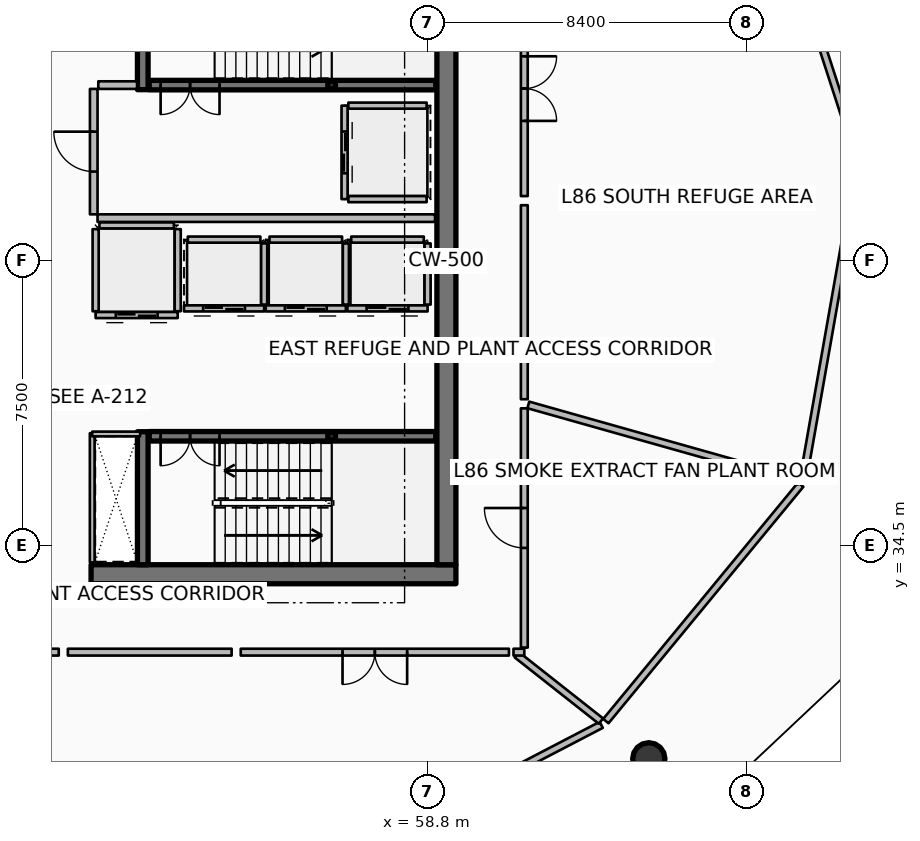
"""IFC4 building model, lengths in metres.
Left out: names, types, materials, properties, quantities, classifications, styles, units other than length and angle.
Written with IfcOpenShell. Run it as: python <this file> out.ifc"""

import sys

from ifc_helpers import new_model, si_unit, direction, frame, frame_2d, origin, origin_2d, place, context, subcontext, project, spatial, rectangle, hollow_rectangle, circle, extrude, element, fill, save


model = new_model("IFC4")
c1 = context("Model", 3, precision=1e-05, world=origin(), true_north=direction((0.0, 1.0)))
c2 = subcontext(c1, "Body", "Model", "MODEL_VIEW")
j1 = project(units=[si_unit("LENGTHUNIT", "METRE"), si_unit("PLANEANGLEUNIT", "RADIAN")], contexts=[c1])
p1 = place(None, origin())
s1 = spatial("IfcSite", under=j1, at=p1, CompositionType="ELEMENT")
p2 = place(p1, origin())
s2 = spatial("IfcBuilding", under=s1, at=p2, CompositionType="ELEMENT")
p3 = place(p2, frame((0.0, 0.0, 343.1)))
s3 = spatial("IfcBuildingStorey", under=s2, at=p3, CompositionType="ELEMENT", Elevation=343.1)
p4 = place(p3, frame((49.95, 33.75, 0.0), z_axis=(0.0, 0.0, 1.0), x_axis=(1.0, 0.0, 0.0)))
e1 = element("IfcWall", 1, at=p4, inside=s3, PredefinedType="SHEAR", context=c2, shape_type="SweptSolid", body=[
    extrude(rectangle(XDim=9.6, YDim=0.5, at=frame_2d((4.8, 0.0))), origin(), (0.0, 0.0, 1.0), 4.2),
])
p5 = place(p3, frame((59.3, 34.0, 0.0), z_axis=(0.0, 0.0, 1.0), x_axis=(0.0, 1.0, 0.0)))
e2 = element("IfcWall", 2, at=p5, inside=s3, PredefinedType="SHEAR", context=c2, shape_type="SweptSolid", body=[
    extrude(rectangle(XDim=16.0, YDim=0.5, at=frame_2d((8.0, 0.0))), origin(), (0.0, 0.0, 1.0), 4.2),
])
for number, where, z_axis, x_axis in (
    (3, (51.31, 46.5, 0.0), (0.0, 0.0, 1.0), (0.0, 1.0, 0.0)),
    (4, (51.31, 34.0, 0.0), (0.0, 0.0, 1.0), (0.0, 1.0, 0.0)),
):
    element("IfcWall", number, at=place(p3, frame(where, z_axis=z_axis, x_axis=x_axis)), inside=s3, PredefinedType="SHEAR", context=c2, shape_type="SweptSolid", body=[
        extrude(rectangle(XDim=3.5, YDim=0.28, at=frame_2d((1.75, 0.0))), origin(), (0.0, 0.0, 1.0), 4.2),
    ])
for number, where, z_axis, x_axis in (
    (5, (56.28, 46.62, 0.0), (0.0, 0.0, 1.0), (1.0, 0.0, 0.0)),
    (6, (56.28, 37.38, 0.0), (0.0, 0.0, 1.0), (1.0, 0.0, 0.0)),
):
    element("IfcColumn", number, at=place(p3, frame(where, z_axis=z_axis, x_axis=x_axis)), inside=s3, PredefinedType="COLUMN", context=c2, shape_type="SweptSolid", body=[
        extrude(hollow_rectangle(XDim=0.2, YDim=0.2, WallThickness=0.01, InnerFilletRadius=0.01, OuterFilletRadius=0.02, at=origin_2d()), origin(), (0.0, 0.0, 1.0), 1.895),
    ])
p6 = place(p3, frame((64.626, 28.893, 0.0), z_axis=(0.0, 0.0, 1.0), x_axis=(1.0, 0.0, 0.0)))
e7 = element("IfcColumn", 7, at=p6, inside=s3, PredefinedType="COLUMN", context=c2, shape_type="SweptSolid", body=[
    extrude(circle(Radius=0.425, at=origin_2d()), origin(), (0.0, 0.0, 1.0), 3.94),
])
p7 = place(p3, frame((51.48, 46.62, 0.0), z_axis=(0.0, 0.0, 1.0), x_axis=(1.0, 0.0, 0.0)))
e8 = element("IfcWall", 8, at=p7, inside=s3, PredefinedType="SOLIDWALL", context=c2, shape_type="SweptSolid", body=[
    extrude(rectangle(XDim=7.54, YDim=0.25, at=frame_2d((3.77, 0.0))), origin(), (0.0, 0.0, 1.0), 3.94),
])
p8 = place(p7, frame((0.3, 0.0, 0.0)))
e9 = element("IfcOpeningElement", 9, at=p8, cuts=e8, PredefinedType="OPENING", context=c2, shape_type="SweptSolid", body=[
    extrude(rectangle(XDim=1.55, YDim=2.15, at=frame_2d((0.775, 1.075))), frame((0.0, 0.135, 0.0), z_axis=(0.0, -1.0, 0.0), x_axis=(1.0, 0.0, 0.0)), (0.0, 0.0, 1.0), 0.27),
])
p9 = place(p3, frame((51.48, 37.38, 0.0), z_axis=(0.0, 0.0, 1.0), x_axis=(1.0, 0.0, 0.0)))
e10 = element("IfcWall", 10, at=p9, inside=s3, PredefinedType="SOLIDWALL", context=c2, shape_type="SweptSolid", body=[
    extrude(rectangle(XDim=7.54, YDim=0.25, at=frame_2d((3.77, 0.0))), origin(), (0.0, 0.0, 1.0), 3.94),
])
p10 = place(p9, frame((0.3, 0.0, 0.0)))
e11 = element("IfcOpeningElement", 11, at=p10, cuts=e10, PredefinedType="OPENING", context=c2, shape_type="SweptSolid", body=[
    extrude(rectangle(XDim=1.55, YDim=2.15, at=frame_2d((0.775, 1.075))), frame((0.0, 0.135, 0.0), z_axis=(0.0, -1.0, 0.0), x_axis=(1.0, 0.0, 0.0)), (0.0, 0.0, 1.0), 0.27),
])
p11 = place(p3, frame((54.505, 40.745, 0.0), z_axis=(0.0, 0.0, 1.0), x_axis=(-1.0, 0.0, 0.0)))
e12 = element("IfcWall", 12, at=p11, inside=s3, PredefinedType="PARTITIONING", context=c2, shape_type="SweptSolid", body=[
    extrude(rectangle(XDim=2.11, YDim=0.16, at=frame_2d((1.055, 0.0))), origin(), (0.0, 0.0, 1.0), 3.94),
])
p12 = place(p11, frame((0.505, 0.0, 0.0)))
e13 = element("IfcOpeningElement", 13, at=p12, cuts=e12, PredefinedType="OPENING", context=c2, shape_type="SweptSolid", body=[
    extrude(rectangle(XDim=1.1, YDim=2.1, at=frame_2d((0.55, 1.05))), frame((0.0, 0.09, 0.0), z_axis=(0.0, -1.0, 0.0), x_axis=(1.0, 0.0, 0.0)), (0.0, 0.0, 1.0), 0.18),
])
p13 = place(p3, frame((54.505, 40.845, 0.0), z_axis=(0.0, 0.0, 1.0), x_axis=(0.0, 1.0, 0.0)))
e14 = element("IfcWall", 14, at=p13, inside=s3, PredefinedType="PARTITIONING", context=c2, shape_type="SweptSolid", body=[
    extrude(rectangle(XDim=1.61, YDim=0.16, at=frame_2d((0.805, 0.0))), origin(), (0.0, 0.0, 1.0), 3.94),
])
p14 = place(p3, frame((52.495, 42.555, 0.0), z_axis=(0.0, 0.0, 1.0), x_axis=(1.0, 0.0, 0.0)))
e15 = element("IfcWall", 15, at=p14, inside=s3, PredefinedType="PARTITIONING", context=c2, shape_type="SweptSolid", body=[
    extrude(rectangle(XDim=1.91, YDim=0.16, at=frame_2d((0.955, 0.0))), origin(), (0.0, 0.0, 1.0), 3.94),
])
p15 = place(p3, frame((56.655, 40.745, 0.0), z_axis=(0.0, 0.0, 1.0), x_axis=(-1.0, 0.0, 0.0)))
e16 = element("IfcWall", 16, at=p15, inside=s3, PredefinedType="PARTITIONING", context=c2, shape_type="SweptSolid", body=[
    extrude(rectangle(XDim=2.11, YDim=0.16, at=frame_2d((1.055, 0.0))), origin(), (0.0, 0.0, 1.0), 3.94),
])
p16 = place(p15, frame((0.505, 0.0, 0.0)))
e17 = element("IfcOpeningElement", 17, at=p16, cuts=e16, PredefinedType="OPENING", context=c2, shape_type="SweptSolid", body=[
    extrude(rectangle(XDim=1.1, YDim=2.1, at=frame_2d((0.55, 1.05))), frame((0.0, 0.09, 0.0), z_axis=(0.0, -1.0, 0.0), x_axis=(1.0, 0.0, 0.0)), (0.0, 0.0, 1.0), 0.18),
])
p17 = place(p3, frame((56.655, 40.845, 0.0), z_axis=(0.0, 0.0, 1.0), x_axis=(0.0, 1.0, 0.0)))
e18 = element("IfcWall", 18, at=p17, inside=s3, PredefinedType="PARTITIONING", context=c2, shape_type="SweptSolid", body=[
    extrude(rectangle(XDim=1.61, YDim=0.16, at=frame_2d((0.805, 0.0))), origin(), (0.0, 0.0, 1.0), 3.94),
])
p18 = place(p3, frame((54.645, 42.555, 0.0), z_axis=(0.0, 0.0, 1.0), x_axis=(1.0, 0.0, 0.0)))
e19 = element("IfcWall", 19, at=p18, inside=s3, PredefinedType="PARTITIONING", context=c2, shape_type="SweptSolid", body=[
    extrude(rectangle(XDim=1.91, YDim=0.16, at=frame_2d((0.955, 0.0))), origin(), (0.0, 0.0, 1.0), 3.94),
])
p19 = place(p3, frame((58.805, 40.745, 0.0), z_axis=(0.0, 0.0, 1.0), x_axis=(-1.0, 0.0, 0.0)))
e20 = element("IfcWall", 20, at=p19, inside=s3, PredefinedType="PARTITIONING", context=c2, shape_type="SweptSolid", body=[
    extrude(rectangle(XDim=2.11, YDim=0.16, at=frame_2d((1.055, 0.0))), origin(), (0.0, 0.0, 1.0), 3.94),
])
p20 = place(p19, frame((0.505, 0.0, 0.0)))
e21 = element("IfcOpeningElement", 21, at=p20, cuts=e20, PredefinedType="OPENING", context=c2, shape_type="SweptSolid", body=[
    extrude(rectangle(XDim=1.1, YDim=2.1, at=frame_2d((0.55, 1.05))), frame((0.0, 0.09, 0.0), z_axis=(0.0, -1.0, 0.0), x_axis=(1.0, 0.0, 0.0)), (0.0, 0.0, 1.0), 0.18),
])
p21 = place(p3, frame((58.805, 40.845, 0.0), z_axis=(0.0, 0.0, 1.0), x_axis=(0.0, 1.0, 0.0)))
e22 = element("IfcWall", 22, at=p21, inside=s3, PredefinedType="PARTITIONING", context=c2, shape_type="SweptSolid", body=[
    extrude(rectangle(XDim=1.61, YDim=0.16, at=frame_2d((0.805, 0.0))), origin(), (0.0, 0.0, 1.0), 3.94),
])
p22 = place(p3, frame((56.795, 42.555, 0.0), z_axis=(0.0, 0.0, 1.0), x_axis=(1.0, 0.0, 0.0)))
e23 = element("IfcWall", 23, at=p22, inside=s3, PredefinedType="PARTITIONING", context=c2, shape_type="SweptSolid", body=[
    extrude(rectangle(XDim=1.91, YDim=0.16, at=frame_2d((0.955, 0.0))), origin(), (0.0, 0.0, 1.0), 3.94),
])
p23 = place(p3, frame((56.62, 46.08, 0.0), z_axis=(0.0, 0.0, 1.0), x_axis=(0.0, -1.0, 0.0)))
e24 = element("IfcWall", 24, at=p23, inside=s3, PredefinedType="PARTITIONING", context=c2, shape_type="SweptSolid", body=[
    extrude(rectangle(XDim=2.46, YDim=0.16, at=frame_2d((1.23, 0.0))), origin(), (0.0, 0.0, 1.0), 3.94),
])
p24 = place(p23, frame((0.68, 0.0, 0.0)))
e25 = element("IfcOpeningElement", 25, at=p24, cuts=e24, PredefinedType="OPENING", context=c2, shape_type="SweptSolid", body=[
    extrude(rectangle(XDim=1.1, YDim=2.1, at=frame_2d((0.55, 1.05))), frame((0.0, 0.09, 0.0), z_axis=(0.0, -1.0, 0.0), x_axis=(1.0, 0.0, 0.0)), (0.0, 0.0, 1.0), 0.18),
])
for number, where, z_axis, x_axis in (
    (26, (56.72, 46.08, 0.0), (0.0, 0.0, 1.0), (1.0, 0.0, 0.0)),
    (27, (56.72, 43.62, 0.0), (0.0, 0.0, 1.0), (1.0, 0.0, 0.0)),
):
    element("IfcWall", number, at=place(p3, frame(where, z_axis=z_axis, x_axis=x_axis)), inside=s3, PredefinedType="PARTITIONING", context=c2, shape_type="SweptSolid", body=[
        extrude(rectangle(XDim=2.06, YDim=0.16, at=frame_2d((1.03, 0.0))), origin(), (0.0, 0.0, 1.0), 3.94),
    ])
p25 = place(p3, frame((52.23, 40.57, 0.0), z_axis=(0.0, 0.0, 1.0), x_axis=(-1.0, 0.0, 0.0)))
e28 = element("IfcWall", 28, at=p25, inside=s3, PredefinedType="PARTITIONING", context=c2, shape_type="SweptSolid", body=[
    extrude(rectangle(XDim=2.16, YDim=0.16, at=frame_2d((1.08, 0.0))), origin(), (0.0, 0.0, 1.0), 3.94),
])
p26 = place(p25, frame((0.53, 0.0, 0.0)))
e29 = element("IfcOpeningElement", 29, at=p26, cuts=e28, PredefinedType="OPENING", context=c2, shape_type="SweptSolid", body=[
    extrude(rectangle(XDim=1.1, YDim=2.1, at=frame_2d((0.55, 1.05))), frame((0.0, 0.09, 0.0), z_axis=(0.0, -1.0, 0.0), x_axis=(1.0, 0.0, 0.0)), (0.0, 0.0, 1.0), 0.18),
])
for number, where, z_axis, x_axis in (
    (30, (52.23, 40.67, 0.0), (0.0, 0.0, 1.0), (0.0, 1.0, 0.0)),
    (31, (50.07, 40.67, 0.0), (0.0, 0.0, 1.0), (0.0, 1.0, 0.0)),
):
    element("IfcWall", number, at=place(p3, frame(where, z_axis=z_axis, x_axis=x_axis)), inside=s3, PredefinedType="PARTITIONING", context=c2, shape_type="SweptSolid", body=[
        extrude(rectangle(XDim=2.16, YDim=0.16, at=frame_2d((1.08, 0.0))), origin(), (0.0, 0.0, 1.0), 3.94),
    ])
p27 = place(p3, frame((50.17, 42.93, 0.0), z_axis=(0.0, 0.0, 1.0), x_axis=(1.0, 0.0, 0.0)))
e32 = element("IfcWall", 32, at=p27, inside=s3, PredefinedType="PARTITIONING", context=c2, shape_type="SweptSolid", body=[
    extrude(rectangle(XDim=1.96, YDim=0.16, at=frame_2d((0.98, 0.0))), origin(), (0.0, 0.0, 1.0), 3.94),
])
p28 = place(p3, frame((50.12, 43.12, 0.0), z_axis=(0.0, 0.0, 1.0), x_axis=(1.0, 0.0, 0.0)))
e33 = element("IfcWall", 33, at=p28, inside=s3, PredefinedType="PARTITIONING", context=c2, shape_type="SweptSolid", body=[
    extrude(rectangle(XDim=8.88, YDim=0.2, at=frame_2d((4.44, 0.0))), origin(), (0.0, 0.0, 1.0), 3.94),
])
p29 = place(p3, frame((50.14, 46.62, 0.0), z_axis=(0.0, 0.0, 1.0), x_axis=(1.0, 0.0, 0.0)))
e34 = element("IfcWall", 34, at=p29, inside=s3, PredefinedType="PARTITIONING", context=c2, shape_type="SweptSolid", body=[
    extrude(rectangle(XDim=1.02, YDim=0.2, at=frame_2d((0.51, 0.0))), origin(), (0.0, 0.0, 1.0), 3.94),
])
p30 = place(p3, frame((50.02, 43.22, 0.0), z_axis=(0.0, 0.0, 1.0), x_axis=(0.0, 1.0, 0.0)))
e35 = element("IfcWall", 35, at=p30, inside=s3, PredefinedType="PARTITIONING", context=c2, shape_type="SweptSolid", body=[
    extrude(rectangle(XDim=3.3, YDim=0.2, at=frame_2d((1.65, 0.0))), origin(), (0.0, 0.0, 1.0), 3.94),
])
p31 = place(p30, frame((1.125, 0.0, 0.0)))
e36 = element("IfcOpeningElement", 36, at=p31, cuts=e35, PredefinedType="OPENING", context=c2, shape_type="SweptSolid", body=[
    extrude(rectangle(XDim=1.05, YDim=2.1, at=frame_2d((0.525, 1.05))), frame((0.0, 0.11, 0.0), z_axis=(0.0, -1.0, 0.0), x_axis=(1.0, 0.0, 0.0)), (0.0, 0.0, 1.0), 0.22),
])
p32 = place(p3, frame((49.98, 34.06, 0.0), z_axis=(0.0, 0.0, 1.0), x_axis=(0.0, 1.0, 0.0)))
e37 = element("IfcWall", 37, at=p32, inside=s3, PredefinedType="PARTITIONING", context=c2, shape_type="SweptSolid", body=[
    extrude(rectangle(XDim=3.4, YDim=0.125, at=frame_2d((1.7, 0.0))), origin(), (0.0, 0.0, 1.0), 3.38),
])
p33 = place(p3, frame((49.98, 37.44, 0.0), z_axis=(0.0, 0.0, 1.0), x_axis=(1.0, 0.0, 0.0)))
e38 = element("IfcWall", 38, at=p33, inside=s3, PredefinedType="PARTITIONING", context=c2, shape_type="SweptSolid", body=[
    extrude(rectangle(XDim=1.26, YDim=0.125, at=frame_2d((0.63, 0.0))), origin(), (0.0, 0.0, 1.0), 3.38),
])
p34 = place(p3, frame((56.837, 26.383, 0.0), z_axis=(0.0, 0.0, 1.0), x_axis=(0.886951970108, 0.461861670548, 0.0)))
e39 = element("IfcWall", 39, at=p34, inside=s3, PredefinedType="PARTITIONING", context=c2, shape_type="SweptSolid", body=[
    extrude(rectangle(XDim=7.37, YDim=0.18, at=frame_2d((3.685, 0.0))), origin(), (0.0, 0.0, 1.0), 2.933),
])
p35 = place(p3, frame((63.496, 29.886, 0.0), z_axis=(0.0, 0.0, 1.0), x_axis=(0.635999094609, 0.771689802743, 0.0)))
e40 = element("IfcWall", 40, at=p35, inside=s3, PredefinedType="PARTITIONING", context=c2, shape_type="SweptSolid", body=[
    extrude(rectangle(XDim=8.062, YDim=0.18, at=frame_2d((4.031, 0.0))), origin(), (0.0, 0.0, 1.0), 2.933),
])
p36 = place(p3, frame((68.688, 36.248, 0.0), z_axis=(0.0, 0.0, 1.0), x_axis=(0.173644811024, 0.984808346636, 0.0)))
e41 = element("IfcWall", 41, at=p36, inside=s3, PredefinedType="PARTITIONING", context=c2, shape_type="SweptSolid", body=[
    extrude(rectangle(XDim=8.425, YDim=0.18, at=frame_2d((4.212, 0.0))), origin(), (0.0, 0.0, 1.0), 2.933),
])
p37 = place(p3, frame((70.141, 44.699, 0.0), z_axis=(0.0, 0.0, 1.0), x_axis=(-0.309030537088, 0.951052115894, 0.0)))
e42 = element("IfcWall", 42, at=p37, inside=s3, PredefinedType="PARTITIONING", context=c2, shape_type="SweptSolid", body=[
    extrude(rectangle(XDim=8.549, YDim=0.18, at=frame_2d((4.274, 0.0))), origin(), (0.0, 0.0, 1.0), 2.933),
])
p38 = place(p3, frame((45.215, 31.7, 0.0), z_axis=(0.0, 0.0, 1.0), x_axis=(1.0, 0.0, 0.0)))
e43 = element("IfcWall", 43, at=p38, inside=s3, PredefinedType="PARTITIONING", context=c2, shape_type="SweptSolid", body=[
    extrude(rectangle(XDim=3.884, YDim=0.18, at=frame_2d((1.942, 0.0))), origin(), (0.0, 0.0, 1.0), 2.933),
])
p39 = place(p3, frame((49.339, 31.7, 0.0), z_axis=(0.0, 0.0, 1.0), x_axis=(1.0, 0.0, 0.0)))
e44 = element("IfcWall", 44, at=p39, inside=s3, PredefinedType="PARTITIONING", context=c2, shape_type="SweptSolid", body=[
    extrude(rectangle(XDim=4.309, YDim=0.18, at=frame_2d((2.155, 0.0))), origin(), (0.0, 0.0, 1.0), 2.933),
])
p40 = place(p3, frame((53.888, 31.7, 0.0), z_axis=(0.0, 0.0, 1.0), x_axis=(1.0, 0.0, 0.0)))
e45 = element("IfcWall", 45, at=p40, inside=s3, PredefinedType="PARTITIONING", context=c2, shape_type="SweptSolid", body=[
    extrude(rectangle(XDim=7.057, YDim=0.18, at=frame_2d((3.529, 0.0))), origin(), (0.0, 0.0, 1.0), 2.933),
])
p41 = place(p40, frame((2.679, 0.0, 0.0)))
e46 = element("IfcOpeningElement", 46, at=p41, cuts=e45, PredefinedType="OPENING", context=c2, shape_type="SweptSolid", body=[
    extrude(rectangle(XDim=1.7, YDim=2.15, at=frame_2d((0.85, 1.075))), frame((0.0, 0.1, 0.0), z_axis=(0.0, -1.0, 0.0), x_axis=(1.0, 0.0, 0.0)), (0.0, 0.0, 1.0), 0.2),
])
p42 = place(p3, frame((61.152, 31.632, 0.0), z_axis=(0.0, 0.0, 1.0), x_axis=(0.785350101028, -0.619051870861, 0.0)))
e47 = element("IfcWall", 47, at=p42, inside=s3, PredefinedType="PARTITIONING", context=c2, shape_type="SweptSolid", body=[
    extrude(rectangle(XDim=2.82, YDim=0.18, at=frame_2d((1.41, 0.0))), origin(), (0.0, 0.0, 1.0), 2.933),
])
p43 = place(p3, frame((61.065, 31.7, 0.0), z_axis=(0.0, 0.0, 1.0), x_axis=(1.0, 0.0, 0.0)))
e48 = element("IfcWall", 48, at=p43, inside=s3, PredefinedType="PARTITIONING", context=c2, shape_type="SweptSolid", body=[
    extrude(rectangle(XDim=0.285, YDim=0.18, at=frame_2d((0.142, 0.0))), origin(), (0.0, 0.0, 1.0), 2.933),
])
p44 = place(p3, frame((61.35, 31.82, 0.0), z_axis=(0.0, 0.0, 1.0), x_axis=(0.0, 1.0, 0.0)))
e49 = element("IfcWall", 49, at=p44, inside=s3, PredefinedType="PARTITIONING", context=c2, shape_type="SweptSolid", body=[
    extrude(rectangle(XDim=6.295, YDim=0.18, at=frame_2d((3.147, 0.0))), origin(), (0.0, 0.0, 1.0), 2.933),
])
p45 = place(p44, frame((2.622, 0.0, 0.0)))
e50 = element("IfcOpeningElement", 50, at=p45, cuts=e49, PredefinedType="OPENING", context=c2, shape_type="SweptSolid", body=[
    extrude(rectangle(XDim=1.05, YDim=2.1, at=frame_2d((0.525, 1.05))), frame((0.0, 0.1, 0.0), z_axis=(0.0, -1.0, 0.0), x_axis=(1.0, 0.0, 0.0)), (0.0, 0.0, 1.0), 0.2),
])
p46 = place(p3, frame((61.456, 38.205, 0.0), z_axis=(0.0, 0.0, 1.0), x_axis=(0.962454537961, -0.271442926522, 0.0)))
e51 = element("IfcWall", 51, at=p46, inside=s3, PredefinedType="PARTITIONING", context=c2, shape_type="SweptSolid", body=[
    extrude(rectangle(XDim=7.4, YDim=0.18, at=frame_2d((3.7, 0.0))), origin(), (0.0, 0.0, 1.0), 2.933),
])
p47 = place(p3, frame((61.35, 38.355, 0.0), z_axis=(0.0, 0.0, 1.0), x_axis=(0.0, 1.0, 0.0)))
e52 = element("IfcWall", 52, at=p47, inside=s3, PredefinedType="PARTITIONING", context=c2, shape_type="SweptSolid", body=[
    extrude(rectangle(XDim=5.105, YDim=0.18, at=frame_2d((2.553, 0.0))), origin(), (0.0, 0.0, 1.0), 2.933),
])
p48 = place(p3, frame((61.35, 43.7, 0.0), z_axis=(0.0, 0.0, 1.0), x_axis=(0.0, 1.0, 0.0)))
e53 = element("IfcWall", 53, at=p48, inside=s3, PredefinedType="PARTITIONING", context=c2, shape_type="SweptSolid", body=[
    extrude(rectangle(XDim=5.656, YDim=0.18, at=frame_2d((2.828, 0.0))), origin(), (0.0, 0.0, 1.0), 2.933),
])
p49 = place(p48, frame((1.978, 0.0, 0.0)))
e54 = element("IfcOpeningElement", 54, at=p49, cuts=e53, PredefinedType="OPENING", context=c2, shape_type="SweptSolid", body=[
    extrude(rectangle(XDim=1.7, YDim=2.15, at=frame_2d((0.85, 1.075))), frame((0.0, 0.1, 0.0), z_axis=(0.0, -1.0, 0.0), x_axis=(1.0, 0.0, 0.0)), (0.0, 0.0, 1.0), 0.2),
])
p50 = place(p8, origin())
e55 = element("IfcDoor", 55, at=p50, inside=s3, OperationType="DOUBLE_DOOR_SINGLE_SWING", PredefinedType="DOOR", context=c2, shape_type="SweptSolid", body=[
    extrude(rectangle(XDim=1.55, YDim=2.15, at=frame_2d((0.775, 1.075))), frame((0.0, 0.025, 0.0), z_axis=(0.0, -1.0, 0.0), x_axis=(1.0, 0.0, 0.0)), (0.0, 0.0, 1.0), 0.05),
])
fill(e9, e55)
p51 = place(p10, origin())
e56 = element("IfcDoor", 56, at=p51, inside=s3, OperationType="DOUBLE_DOOR_SINGLE_SWING", PredefinedType="DOOR", context=c2, shape_type="SweptSolid", body=[
    extrude(rectangle(XDim=1.55, YDim=2.15, at=frame_2d((0.775, 1.075))), frame((0.0, 0.025, 0.0), z_axis=(0.0, -1.0, 0.0), x_axis=(1.0, 0.0, 0.0)), (0.0, 0.0, 1.0), 0.05),
])
fill(e11, e56)
p52 = place(p12, origin())
e57 = element("IfcDoor", 57, at=p52, inside=s3, OperationType="DOUBLE_DOOR_SLIDING", PredefinedType="DOOR", context=c2, shape_type="SweptSolid", body=[
    extrude(rectangle(XDim=1.1, YDim=2.1, at=frame_2d((0.55, 1.05))), frame((0.0, 0.025, 0.0), z_axis=(0.0, -1.0, 0.0), x_axis=(1.0, 0.0, 0.0)), (0.0, 0.0, 1.0), 0.05),
])
fill(e13, e57)
p53 = place(p16, origin())
e58 = element("IfcDoor", 58, at=p53, inside=s3, OperationType="DOUBLE_DOOR_SLIDING", PredefinedType="DOOR", context=c2, shape_type="SweptSolid", body=[
    extrude(rectangle(XDim=1.1, YDim=2.1, at=frame_2d((0.55, 1.05))), frame((0.0, 0.025, 0.0), z_axis=(0.0, -1.0, 0.0), x_axis=(1.0, 0.0, 0.0)), (0.0, 0.0, 1.0), 0.05),
])
fill(e17, e58)
p54 = place(p20, origin())
e59 = element("IfcDoor", 59, at=p54, inside=s3, OperationType="DOUBLE_DOOR_SLIDING", PredefinedType="DOOR", context=c2, shape_type="SweptSolid", body=[
    extrude(rectangle(XDim=1.1, YDim=2.1, at=frame_2d((0.55, 1.05))), frame((0.0, 0.025, 0.0), z_axis=(0.0, -1.0, 0.0), x_axis=(1.0, 0.0, 0.0)), (0.0, 0.0, 1.0), 0.05),
])
fill(e21, e59)
p55 = place(p24, origin())
e60 = element("IfcDoor", 60, at=p55, inside=s3, OperationType="DOUBLE_DOOR_SLIDING", PredefinedType="DOOR", context=c2, shape_type="SweptSolid", body=[
    extrude(rectangle(XDim=1.1, YDim=2.1, at=frame_2d((0.55, 1.05))), frame((0.0, 0.025, 0.0), z_axis=(0.0, -1.0, 0.0), x_axis=(1.0, 0.0, 0.0)), (0.0, 0.0, 1.0), 0.05),
])
fill(e25, e60)
p56 = place(p26, origin())
e61 = element("IfcDoor", 61, at=p56, inside=s3, OperationType="DOUBLE_DOOR_SLIDING", PredefinedType="DOOR", context=c2, shape_type="SweptSolid", body=[
    extrude(rectangle(XDim=1.1, YDim=2.1, at=frame_2d((0.55, 1.05))), frame((0.0, 0.025, 0.0), z_axis=(0.0, -1.0, 0.0), x_axis=(1.0, 0.0, 0.0)), (0.0, 0.0, 1.0), 0.05),
])
fill(e29, e61)
p57 = place(p31, origin())
e62 = element("IfcDoor", 62, at=p57, inside=s3, OperationType="SINGLE_SWING_RIGHT", PredefinedType="DOOR", context=c2, shape_type="SweptSolid", body=[
    extrude(rectangle(XDim=1.05, YDim=2.1, at=frame_2d((0.525, 1.05))), frame((0.0, 0.025, 0.0), z_axis=(0.0, -1.0, 0.0), x_axis=(1.0, 0.0, 0.0)), (0.0, 0.0, 1.0), 0.05),
])
fill(e36, e62)
p58 = place(p41, origin())
e63 = element("IfcDoor", 63, at=p58, inside=s3, OperationType="DOUBLE_DOOR_SINGLE_SWING", PredefinedType="DOOR", context=c2, shape_type="SweptSolid", body=[
    extrude(rectangle(XDim=1.7, YDim=2.15, at=frame_2d((0.85, 1.075))), frame((0.0, 0.025, 0.0), z_axis=(0.0, -1.0, 0.0), x_axis=(1.0, 0.0, 0.0)), (0.0, 0.0, 1.0), 0.05),
])
fill(e46, e63)
p59 = place(p45, origin())
e64 = element("IfcDoor", 64, at=p59, inside=s3, OperationType="SINGLE_SWING_RIGHT", PredefinedType="DOOR", context=c2, shape_type="SweptSolid", body=[
    extrude(rectangle(XDim=1.05, YDim=2.1, at=frame_2d((0.525, 1.05))), frame((0.0, 0.025, 0.0), z_axis=(0.0, -1.0, 0.0), x_axis=(1.0, 0.0, 0.0)), (0.0, 0.0, 1.0), 0.05),
])
fill(e50, e64)
p60 = place(p49, origin())
e65 = element("IfcDoor", 65, at=p60, inside=s3, OperationType="DOUBLE_DOOR_SINGLE_SWING", PredefinedType="DOOR", context=c2, shape_type="SweptSolid", body=[
    extrude(rectangle(XDim=1.7, YDim=2.15, at=frame_2d((0.85, 1.075))), frame((0.0, 0.025, 0.0), z_axis=(0.0, -1.0, 0.0), x_axis=(1.0, 0.0, 0.0)), (0.0, 0.0, 1.0), 0.05),
])
fill(e54, e65)
save(model, sys.argv[1])
